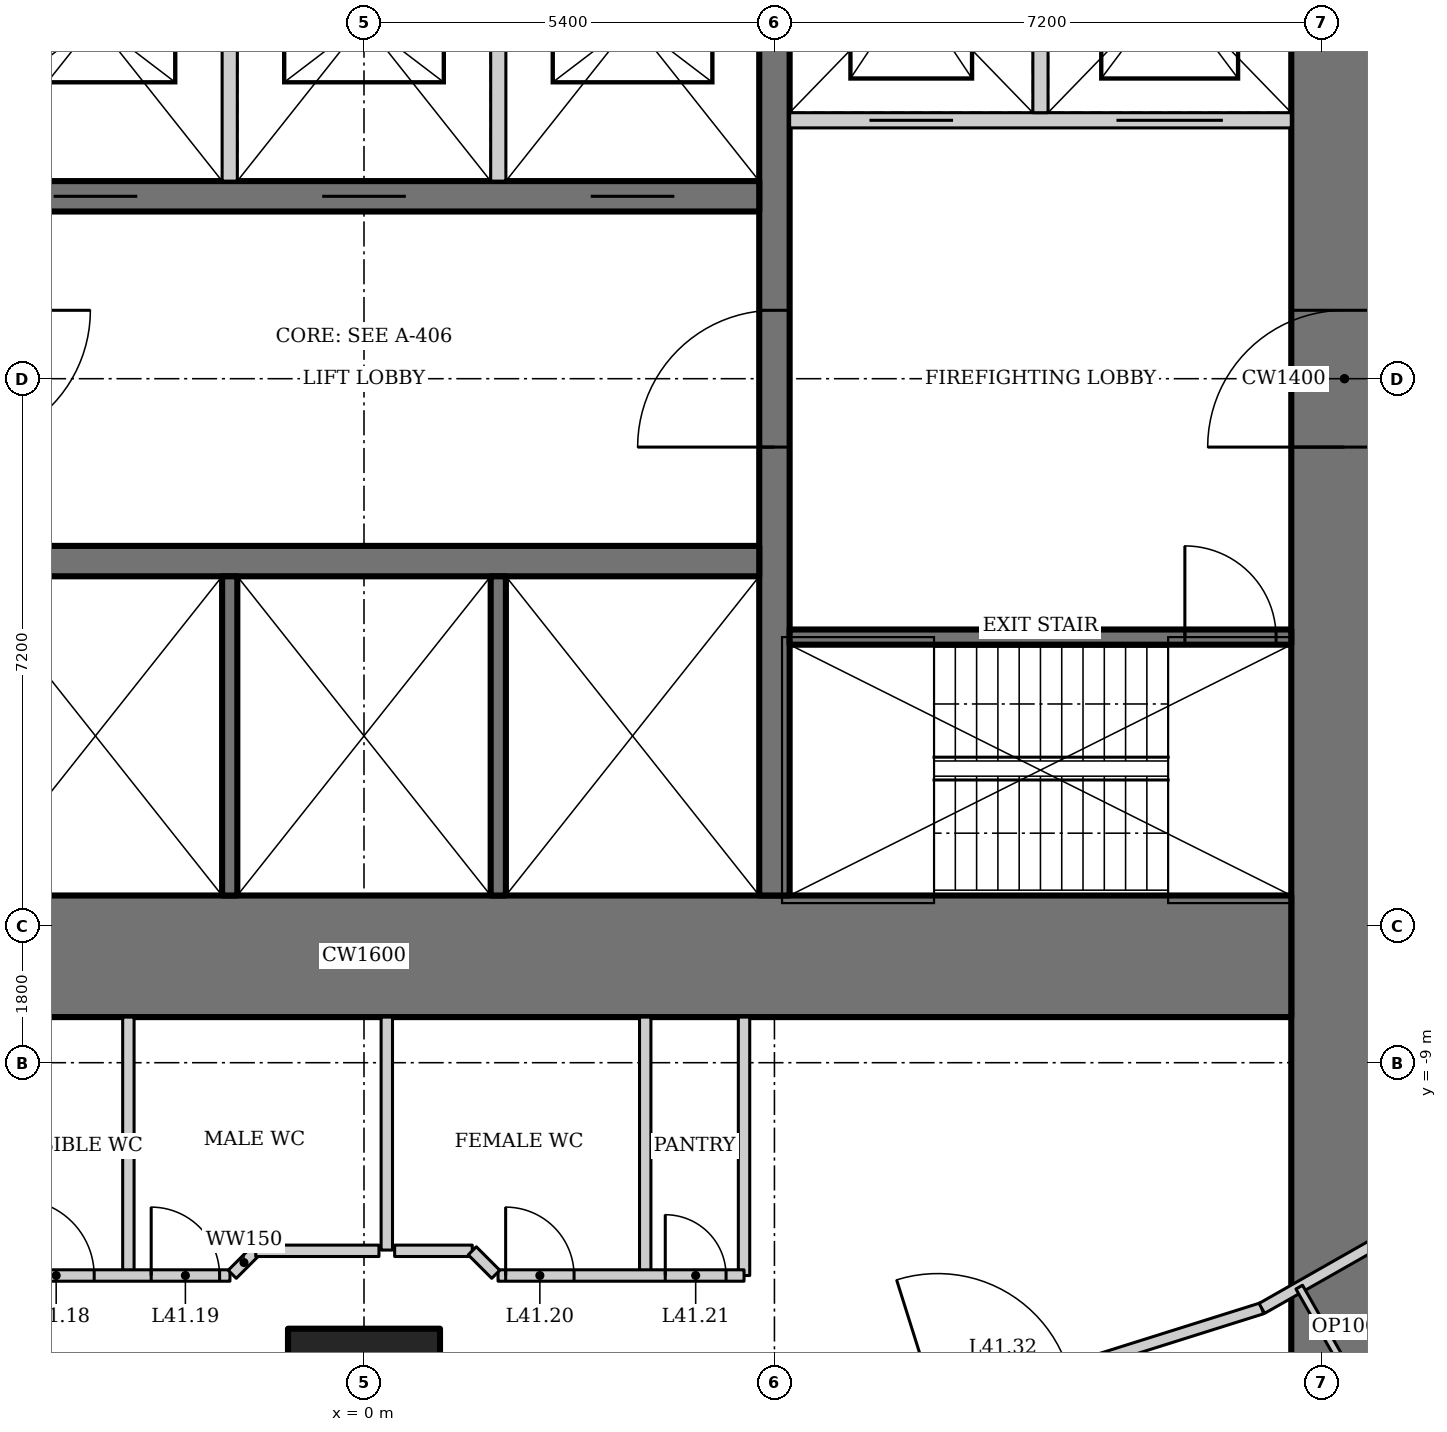
"""IFC4 building model, lengths in metres.
Left out: names, types, materials, properties, quantities, classifications, styles, units other than length and angle.
Written with IfcOpenShell. Run it as: python <this file> out.ifc"""

import sys

from ifc_helpers import new_model, si_unit, direction, frame, frame_2d, origin, origin_2d, place, context, subcontext, project, spatial, rectangle, hollow_rectangle, extrude, element, fill, save


model = new_model("IFC4")
c1 = context("Model", 3, precision=1e-05, world=origin(), true_north=direction((0.0, 1.0)))
c2 = subcontext(c1, "Body", "Model", "MODEL_VIEW")
j1 = project(units=[si_unit("LENGTHUNIT", "METRE"), si_unit("PLANEANGLEUNIT", "RADIAN")], contexts=[c1])
p1 = place(None, origin())
s1 = spatial("IfcSite", under=j1, at=p1, CompositionType="ELEMENT")
p2 = place(p1, origin())
s2 = spatial("IfcBuilding", under=s1, at=p2, CompositionType="ELEMENT")
p3 = place(p2, frame((0.0, 0.0, 176.2)))
s3 = spatial("IfcBuildingStorey", under=s2, at=p3, CompositionType="ELEMENT", Elevation=176.2)
p4 = place(p3, frame((0.0, -13.5, 0.0), z_axis=(0.0, 0.0, 1.0), x_axis=(1.0, 0.0, 0.0)))
e1 = element("IfcColumn", 1, at=p4, inside=s3, PredefinedType="COLUMN", context=c2, shape_type="SweptSolid", body=[
    extrude(hollow_rectangle(XDim=2.0, YDim=2.0, WallThickness=0.17, at=origin_2d()), origin(), (0.0, 0.0, 1.0), 4.2),
])
p5 = place(p3, frame((12.9, -13.0, 0.0), z_axis=(0.0, 0.0, 1.0), x_axis=(0.0, 1.0, 0.0)))
e2 = element("IfcWall", 2, at=p5, inside=s3, PredefinedType="SHEAR", context=c2, shape_type="SweptSolid", body=[
    extrude(rectangle(XDim=26.0, YDim=1.4, at=frame_2d((13.0, 0.0))), origin(), (0.0, 0.0, 1.0), 4.2),
])
p6 = place(p5, frame((12.1, 0.0, 0.0)))
e3 = element("IfcOpeningElement", 3, at=p6, cuts=e2, PredefinedType="OPENING", context=c2, shape_type="SweptSolid", body=[
    extrude(rectangle(XDim=1.8, YDim=2.1, at=frame_2d((0.9, 1.05))), frame((0.0, 0.71, 0.0), z_axis=(0.0, -1.0, 0.0), x_axis=(1.0, 0.0, 0.0)), (0.0, 0.0, 1.0), 1.42),
])
p7 = place(p3, frame((-12.2, -7.6, 0.0), z_axis=(0.0, 0.0, 1.0), x_axis=(1.0, 0.0, 0.0)))
e4 = element("IfcWall", 4, at=p7, inside=s3, PredefinedType="SHEAR", context=c2, shape_type="SweptSolid", body=[
    extrude(rectangle(XDim=24.4, YDim=1.6, at=frame_2d((12.2, 0.0))), origin(), (0.0, 0.0, 1.0), 4.2),
])
p8 = place(p3, frame((5.4, -6.8, 0.0), z_axis=(0.0, 0.0, 1.0), x_axis=(0.0, 1.0, 0.0)))
e5 = element("IfcWall", 5, at=p8, inside=s3, PredefinedType="SHEAR", context=c2, shape_type="SweptSolid", body=[
    extrude(rectangle(XDim=13.6, YDim=0.4, at=frame_2d((6.8, 0.0))), origin(), (0.0, 0.0, 1.0), 4.2),
])
p9 = place(p8, frame((5.9, 0.0, 0.0)))
e6 = element("IfcOpeningElement", 6, at=p9, cuts=e5, PredefinedType="OPENING", context=c2, shape_type="SweptSolid", body=[
    extrude(rectangle(XDim=1.8, YDim=2.1, at=frame_2d((0.9, 1.05))), frame((0.0, 0.21, 0.0), z_axis=(0.0, -1.0, 0.0), x_axis=(1.0, 0.0, 0.0)), (0.0, 0.0, 1.0), 0.42),
])
p10 = place(p3, frame((-5.2, -2.4, 0.0), z_axis=(0.0, 0.0, 1.0), x_axis=(1.0, 0.0, 0.0)))
e7 = element("IfcWall", 7, at=p10, inside=s3, PredefinedType="SHEAR", context=c2, shape_type="SweptSolid", body=[
    extrude(rectangle(XDim=10.4, YDim=0.4, at=frame_2d((5.2, 0.0))), origin(), (0.0, 0.0, 1.0), 4.2),
])
for number, where, z_axis, x_axis in (
    (8, (-1.767, -2.6, 0.0), (0.0, 0.0, 1.0), (0.0, -1.0, 0.0)),
    (9, (1.767, -2.6, 0.0), (0.0, 0.0, 1.0), (0.0, -1.0, 0.0)),
):
    element("IfcWall", number, at=place(p3, frame(where, z_axis=z_axis, x_axis=x_axis)), inside=s3, PredefinedType="SOLIDWALL", context=c2, shape_type="SweptSolid", body=[
        extrude(rectangle(XDim=4.2, YDim=0.2, at=frame_2d((2.1, 0.0))), origin(), (0.0, 0.0, 1.0), 4.2),
    ])
p11 = place(p3, frame((5.2, 2.4, 0.0), z_axis=(0.0, 0.0, 1.0), x_axis=(-1.0, 0.0, 0.0)))
e10 = element("IfcWall", 10, at=p11, inside=s3, PredefinedType="SHEAR", context=c2, shape_type="SweptSolid", body=[
    extrude(rectangle(XDim=10.4, YDim=0.4, at=frame_2d((5.2, 0.0))), origin(), (0.0, 0.0, 1.0), 4.2),
])
p12 = place(p11, frame((8.183, 0.0, 0.0)))
e11 = element("IfcOpeningElement", 11, at=p12, cuts=e10, PredefinedType="OPENING", context=c2, shape_type="SweptSolid", body=[
    extrude(rectangle(XDim=1.1, YDim=2.2, at=frame_2d((0.55, 1.1))), frame((0.0, 0.21, 0.0), z_axis=(0.0, -1.0, 0.0), x_axis=(1.0, 0.0, 0.0)), (0.0, 0.0, 1.0), 0.42),
])
p13 = place(p11, frame((4.65, 0.0, 0.0)))
e12 = element("IfcOpeningElement", 12, at=p13, cuts=e10, PredefinedType="OPENING", context=c2, shape_type="SweptSolid", body=[
    extrude(rectangle(XDim=1.1, YDim=2.2, at=frame_2d((0.55, 1.1))), frame((0.0, 0.21, 0.0), z_axis=(0.0, -1.0, 0.0), x_axis=(1.0, 0.0, 0.0)), (0.0, 0.0, 1.0), 0.42),
])
p14 = place(p11, frame((1.117, 0.0, 0.0)))
e13 = element("IfcOpeningElement", 13, at=p14, cuts=e10, PredefinedType="OPENING", context=c2, shape_type="SweptSolid", body=[
    extrude(rectangle(XDim=1.1, YDim=2.2, at=frame_2d((0.55, 1.1))), frame((0.0, 0.21, 0.0), z_axis=(0.0, -1.0, 0.0), x_axis=(1.0, 0.0, 0.0)), (0.0, 0.0, 1.0), 0.42),
])
for number, where, z_axis, x_axis in (
    (14, (-1.767, 2.6, 0.0), (0.0, 0.0, 1.0), (0.0, 1.0, 0.0)),
    (15, (1.767, 2.6, 0.0), (0.0, 0.0, 1.0), (0.0, 1.0, 0.0)),
):
    element("IfcWall", number, at=place(p3, frame(where, z_axis=z_axis, x_axis=x_axis)), inside=s3, PredefinedType="SOLIDWALL", context=c2, shape_type="SweptSolid", body=[
        extrude(rectangle(XDim=4.2, YDim=0.2, at=frame_2d((2.1, 0.0))), origin(), (0.0, 0.0, 1.0), 4.2),
    ])
p15 = place(p3, frame((5.6, -3.4, 0.0), z_axis=(0.0, 0.0, 1.0), x_axis=(1.0, 0.0, 0.0)))
e16 = element("IfcWall", 16, at=p15, inside=s3, PredefinedType="SHEAR", context=c2, shape_type="SweptSolid", body=[
    extrude(rectangle(XDim=6.6, YDim=0.2, at=frame_2d((3.3, 0.0))), origin(), (0.0, 0.0, 1.0), 4.2),
])
p16 = place(p15, frame((5.2, 0.0, 0.0)))
e17 = element("IfcOpeningElement", 17, at=p16, cuts=e16, PredefinedType="OPENING", context=c2, shape_type="SweptSolid", body=[
    extrude(rectangle(XDim=1.2, YDim=2.1, at=frame_2d((0.6, 1.05))), frame((0.0, 0.11, 0.0), z_axis=(0.0, -1.0, 0.0), x_axis=(1.0, 0.0, 0.0)), (0.0, 0.0, 1.0), 0.22),
])
p17 = place(p3, frame((12.2, 3.4, 0.0), z_axis=(0.0, 0.0, 1.0), x_axis=(-1.0, 0.0, 0.0)))
e18 = element("IfcWall", 18, at=p17, inside=s3, PredefinedType="SOLIDWALL", context=c2, shape_type="SweptSolid", body=[
    extrude(rectangle(XDim=6.6, YDim=0.2, at=frame_2d((3.3, 0.0))), origin(), (0.0, 0.0, 1.0), 4.2),
])
p18 = place(p17, frame((4.45, 0.0, 0.0)))
e19 = element("IfcOpeningElement", 19, at=p18, cuts=e18, PredefinedType="OPENING", context=c2, shape_type="SweptSolid", body=[
    extrude(rectangle(XDim=1.1, YDim=2.2, at=frame_2d((0.55, 1.1))), frame((0.0, 0.11, 0.0), z_axis=(0.0, -1.0, 0.0), x_axis=(1.0, 0.0, 0.0)), (0.0, 0.0, 1.0), 0.22),
])
p19 = place(p17, frame((0.9, 0.0, 0.0)))
e20 = element("IfcOpeningElement", 20, at=p19, cuts=e18, PredefinedType="OPENING", context=c2, shape_type="SweptSolid", body=[
    extrude(rectangle(XDim=1.4, YDim=2.2, at=frame_2d((0.7, 1.1))), frame((0.0, 0.11, 0.0), z_axis=(0.0, -1.0, 0.0), x_axis=(1.0, 0.0, 0.0)), (0.0, 0.0, 1.0), 0.22),
])
p20 = place(p3, frame((8.9, 3.5, 0.0), z_axis=(0.0, 0.0, 1.0), x_axis=(0.0, 1.0, 0.0)))
e21 = element("IfcWall", 21, at=p20, inside=s3, PredefinedType="SOLIDWALL", context=c2, shape_type="SweptSolid", body=[
    extrude(rectangle(XDim=3.3, YDim=0.2, at=frame_2d((1.65, 0.0))), origin(), (0.0, 0.0, 1.0), 4.2),
])
p21 = place(p3, frame((7.004, -13.746, 0.0), z_axis=(0.0, 0.0, 1.0), x_axis=(0.953893934057, 0.300143903101, 0.0)))
e22 = element("IfcWall", 22, at=p21, inside=s3, PredefinedType="PARTITIONING", context=c2, shape_type="SweptSolid", body=[
    extrude(rectangle(XDim=5.042, YDim=0.15, at=frame_2d((2.521, 0.0))), origin(), (0.0, 0.0, 1.0), 4.05),
])
p22 = place(p21, frame((0.57, 0.0, 0.0)))
e23 = element("IfcOpeningElement", 23, at=p22, cuts=e22, PredefinedType="OPENING", context=c2, shape_type="SweptSolid", body=[
    extrude(rectangle(XDim=1.8, YDim=2.1, at=frame_2d((0.9, 1.05))), frame((0.0, 0.085, 0.0), z_axis=(0.0, -1.0, 0.0), x_axis=(1.0, 0.0, 0.0)), (0.0, 0.0, 1.0), 0.17),
])
p23 = place(p3, frame((11.813, -12.232, 0.0), z_axis=(0.0, 0.0, 1.0), x_axis=(0.869375991036, 0.494151177485, 0.0)))
e24 = element("IfcWall", 24, at=p23, inside=s3, PredefinedType="PARTITIONING", context=c2, shape_type="SweptSolid", body=[
    extrude(rectangle(XDim=5.532, YDim=0.15, at=frame_2d((2.766, 0.0))), origin(), (0.0, 0.0, 1.0), 4.05),
])
for number, where, z_axis, x_axis in (
    (25, (5.0, -8.4, 0.0), (0.0, 0.0, 1.0), (0.0, -1.0, 0.0)),
    (26, (-3.1, -8.4, 0.0), (0.0, 0.0, 1.0), (0.0, -1.0, 0.0)),
    (27, (3.7, -8.4, 0.0), (0.0, 0.0, 1.0), (0.0, -1.0, 0.0)),
):
    element("IfcWall", number, at=place(p3, frame(where, z_axis=z_axis, x_axis=x_axis)), inside=s3, PredefinedType="SOLIDWALL", context=c2, shape_type="SweptSolid", body=[
        extrude(rectangle(XDim=3.4, YDim=0.15, at=frame_2d((1.7, 0.0))), origin(), (0.0, 0.0, 1.0), 4.05),
    ])
p24 = place(p3, frame((12.9, -13.0, 0.0), z_axis=(0.0, 0.0, 1.0), x_axis=(-0.494173075358, 0.869363543974, 0.0)))
e28 = element("IfcWall", 28, at=p24, inside=s3, PredefinedType="PARTITIONING", context=c2, shape_type="SweptSolid", body=[
    extrude(rectangle(XDim=1.204, YDim=0.1, at=frame_2d((0.602, 0.0))), origin(), (0.0, 0.0, 1.0), 4.05),
])
p25 = place(p3, frame((-5.0, -11.8, 0.0), z_axis=(0.0, 0.0, 1.0), x_axis=(1.0, 0.0, 0.0)))
e29 = element("IfcWall", 29, at=p25, inside=s3, PredefinedType="SOLIDWALL", context=c2, shape_type="SweptSolid", body=[
    extrude(rectangle(XDim=3.236, YDim=0.15, at=frame_2d((1.618, 0.0))), origin(), (0.0, 0.0, 1.0), 4.05),
])
p26 = place(p25, frame((0.45, 0.0, 0.0)))
e30 = element("IfcOpeningElement", 30, at=p26, cuts=e29, PredefinedType="OPENING", context=c2, shape_type="SweptSolid", body=[
    extrude(rectangle(XDim=1.0, YDim=2.1, at=frame_2d((0.5, 1.05))), frame((0.0, 0.085, 0.0), z_axis=(0.0, -1.0, 0.0), x_axis=(1.0, 0.0, 0.0)), (0.0, 0.0, 1.0), 0.17),
])
p27 = place(p25, frame((2.2, 0.0, 0.0)))
e31 = element("IfcOpeningElement", 31, at=p27, cuts=e29, PredefinedType="OPENING", context=c2, shape_type="SweptSolid", body=[
    extrude(rectangle(XDim=0.9, YDim=2.1, at=frame_2d((0.45, 1.05))), frame((0.0, 0.085, 0.0), z_axis=(0.0, -1.0, 0.0), x_axis=(1.0, 0.0, 0.0)), (0.0, 0.0, 1.0), 0.17),
])
p28 = place(p3, frame((1.764, -11.8, 0.0), z_axis=(0.0, 0.0, 1.0), x_axis=(1.0, 0.0, 0.0)))
e32 = element("IfcWall", 32, at=p28, inside=s3, PredefinedType="SOLIDWALL", context=c2, shape_type="SweptSolid", body=[
    extrude(rectangle(XDim=3.236, YDim=0.15, at=frame_2d((1.618, 0.0))), origin(), (0.0, 0.0, 1.0), 4.05),
])
p29 = place(p28, frame((0.1, 0.0, 0.0)))
e33 = element("IfcOpeningElement", 33, at=p29, cuts=e32, PredefinedType="OPENING", context=c2, shape_type="SweptSolid", body=[
    extrude(rectangle(XDim=0.9, YDim=2.1, at=frame_2d((0.45, 1.05))), frame((0.0, 0.085, 0.0), z_axis=(0.0, -1.0, 0.0), x_axis=(1.0, 0.0, 0.0)), (0.0, 0.0, 1.0), 0.17),
])
p30 = place(p28, frame((2.2, 0.0, 0.0)))
e34 = element("IfcOpeningElement", 34, at=p30, cuts=e32, PredefinedType="OPENING", context=c2, shape_type="SweptSolid", body=[
    extrude(rectangle(XDim=0.8, YDim=2.1, at=frame_2d((0.4, 1.05))), frame((0.0, 0.085, 0.0), z_axis=(0.0, -1.0, 0.0), x_axis=(1.0, 0.0, 0.0)), (0.0, 0.0, 1.0), 0.17),
])
p31 = place(p3, frame((0.3, -8.4, 0.0), z_axis=(0.0, 0.0, 1.0), x_axis=(0.0, -1.0, 0.0)))
e35 = element("IfcWall", 35, at=p31, inside=s3, PredefinedType="SOLIDWALL", context=c2, shape_type="SweptSolid", body=[
    extrude(rectangle(XDim=3.065, YDim=0.15, at=frame_2d((1.533, 0.0))), origin(), (0.0, 0.0, 1.0), 4.05),
])
p32 = place(p3, frame((-1.734, -11.784, 0.0), z_axis=(0.0, 0.0, 1.0), x_axis=(0.707106781187, 0.707106781187, 0.0)))
e36 = element("IfcWall", 36, at=p32, inside=s3, PredefinedType="SOLIDWALL", context=c2, shape_type="SweptSolid", body=[
    extrude(rectangle(XDim=0.437, YDim=0.15, at=frame_2d((0.219, 0.0))), origin(), (0.0, 0.0, 1.0), 4.05),
])
p33 = place(p3, frame((-1.425, -11.475, 0.0), z_axis=(0.0, 0.0, 1.0), x_axis=(1.0, 0.0, 0.0)))
e37 = element("IfcWall", 37, at=p33, inside=s3, PredefinedType="SOLIDWALL", context=c2, shape_type="SweptSolid", body=[
    extrude(rectangle(XDim=1.621, YDim=0.15, at=frame_2d((0.811, 0.0))), origin(), (0.0, 0.0, 1.0), 4.05),
])
p34 = place(p3, frame((0.403, -11.475, 0.0), z_axis=(0.0, 0.0, 1.0), x_axis=(1.0, 0.0, 0.0)))
e38 = element("IfcWall", 38, at=p34, inside=s3, PredefinedType="SOLIDWALL", context=c2, shape_type="SweptSolid", body=[
    extrude(rectangle(XDim=1.021, YDim=0.15, at=frame_2d((0.511, 0.0))), origin(), (0.0, 0.0, 1.0), 4.05),
])
p35 = place(p3, frame((1.425, -11.475, 0.0), z_axis=(0.0, 0.0, 1.0), x_axis=(0.707106781187, -0.707106781187, 0.0)))
e39 = element("IfcWall", 39, at=p35, inside=s3, PredefinedType="SOLIDWALL", context=c2, shape_type="SweptSolid", body=[
    extrude(rectangle(XDim=0.437, YDim=0.15, at=frame_2d((0.219, 0.0))), origin(), (0.0, 0.0, 1.0), 4.05),
])
p36 = place(p9, origin())
e40 = element("IfcDoor", 40, at=p36, inside=s3, OperationType="DOUBLE_DOOR_DOUBLE_SWING", PredefinedType="DOOR", context=c2, shape_type="SweptSolid", body=[
    extrude(rectangle(XDim=1.8, YDim=2.1, at=frame_2d((0.9, 1.05))), frame((0.0, 0.025, 0.0), z_axis=(0.0, -1.0, 0.0), x_axis=(1.0, 0.0, 0.0)), (0.0, 0.0, 1.0), 0.05),
])
fill(e6, e40)
p37 = place(p16, origin())
e41 = element("IfcDoor", 41, at=p37, inside=s3, OperationType="SINGLE_SWING_RIGHT", PredefinedType="DOOR", context=c2, shape_type="SweptSolid", body=[
    extrude(rectangle(XDim=1.2, YDim=2.1, at=frame_2d((0.6, 1.05))), frame((0.0, 0.025, 0.0), z_axis=(0.0, -1.0, 0.0), x_axis=(1.0, 0.0, 0.0)), (0.0, 0.0, 1.0), 0.05),
])
fill(e17, e41)
p38 = place(p6, origin())
e42 = element("IfcDoor", 42, at=p38, inside=s3, OperationType="DOUBLE_DOOR_DOUBLE_SWING", PredefinedType="DOOR", context=c2, shape_type="SweptSolid", body=[
    extrude(rectangle(XDim=1.8, YDim=2.1, at=frame_2d((0.9, 1.05))), frame((0.0, 0.025, 0.0), z_axis=(0.0, -1.0, 0.0), x_axis=(1.0, 0.0, 0.0)), (0.0, 0.0, 1.0), 0.05),
])
fill(e3, e42)
p39 = place(p12, origin())
e43 = element("IfcDoor", 43, at=p39, inside=s3, OperationType="DOUBLE_DOOR_SLIDING", PredefinedType="DOOR", context=c2, shape_type="SweptSolid", body=[
    extrude(rectangle(XDim=1.1, YDim=2.2, at=frame_2d((0.55, 1.1))), frame((0.0, 0.025, 0.0), z_axis=(0.0, -1.0, 0.0), x_axis=(1.0, 0.0, 0.0)), (0.0, 0.0, 1.0), 0.05),
])
fill(e11, e43)
p40 = place(p13, origin())
e44 = element("IfcDoor", 44, at=p40, inside=s3, OperationType="DOUBLE_DOOR_SLIDING", PredefinedType="DOOR", context=c2, shape_type="SweptSolid", body=[
    extrude(rectangle(XDim=1.1, YDim=2.2, at=frame_2d((0.55, 1.1))), frame((0.0, 0.025, 0.0), z_axis=(0.0, -1.0, 0.0), x_axis=(1.0, 0.0, 0.0)), (0.0, 0.0, 1.0), 0.05),
])
fill(e12, e44)
p41 = place(p14, origin())
e45 = element("IfcDoor", 45, at=p41, inside=s3, OperationType="DOUBLE_DOOR_SLIDING", PredefinedType="DOOR", context=c2, shape_type="SweptSolid", body=[
    extrude(rectangle(XDim=1.1, YDim=2.2, at=frame_2d((0.55, 1.1))), frame((0.0, 0.025, 0.0), z_axis=(0.0, -1.0, 0.0), x_axis=(1.0, 0.0, 0.0)), (0.0, 0.0, 1.0), 0.05),
])
fill(e13, e45)
p42 = place(p18, origin())
e46 = element("IfcDoor", 46, at=p42, inside=s3, OperationType="DOUBLE_DOOR_SLIDING", PredefinedType="DOOR", context=c2, shape_type="SweptSolid", body=[
    extrude(rectangle(XDim=1.1, YDim=2.2, at=frame_2d((0.55, 1.1))), frame((0.0, 0.025, 0.0), z_axis=(0.0, -1.0, 0.0), x_axis=(1.0, 0.0, 0.0)), (0.0, 0.0, 1.0), 0.05),
])
fill(e19, e46)
p43 = place(p19, origin())
e47 = element("IfcDoor", 47, at=p43, inside=s3, OperationType="DOUBLE_DOOR_SLIDING", PredefinedType="DOOR", context=c2, shape_type="SweptSolid", body=[
    extrude(rectangle(XDim=1.4, YDim=2.2, at=frame_2d((0.7, 1.1))), frame((0.0, 0.025, 0.0), z_axis=(0.0, -1.0, 0.0), x_axis=(1.0, 0.0, 0.0)), (0.0, 0.0, 1.0), 0.05),
])
fill(e20, e47)
p44 = place(p26, origin())
e48 = element("IfcDoor", 48, at=p44, inside=s3, OperationType="SINGLE_SWING_LEFT", PredefinedType="DOOR", context=c2, shape_type="SweptSolid", body=[
    extrude(rectangle(XDim=1.0, YDim=2.1, at=frame_2d((0.5, 1.05))), frame((0.0, 0.025, 0.0), z_axis=(0.0, -1.0, 0.0), x_axis=(1.0, 0.0, 0.0)), (0.0, 0.0, 1.0), 0.05),
])
fill(e30, e48)
p45 = place(p27, origin())
e49 = element("IfcDoor", 49, at=p45, inside=s3, OperationType="SINGLE_SWING_LEFT", PredefinedType="DOOR", context=c2, shape_type="SweptSolid", body=[
    extrude(rectangle(XDim=0.9, YDim=2.1, at=frame_2d((0.45, 1.05))), frame((0.0, 0.025, 0.0), z_axis=(0.0, -1.0, 0.0), x_axis=(1.0, 0.0, 0.0)), (0.0, 0.0, 1.0), 0.05),
])
fill(e31, e49)
p46 = place(p29, origin())
e50 = element("IfcDoor", 50, at=p46, inside=s3, OperationType="SINGLE_SWING_LEFT", PredefinedType="DOOR", context=c2, shape_type="SweptSolid", body=[
    extrude(rectangle(XDim=0.9, YDim=2.1, at=frame_2d((0.45, 1.05))), frame((0.0, 0.025, 0.0), z_axis=(0.0, -1.0, 0.0), x_axis=(1.0, 0.0, 0.0)), (0.0, 0.0, 1.0), 0.05),
])
fill(e33, e50)
p47 = place(p30, origin())
e51 = element("IfcDoor", 51, at=p47, inside=s3, OperationType="SINGLE_SWING_LEFT", PredefinedType="DOOR", context=c2, shape_type="SweptSolid", body=[
    extrude(rectangle(XDim=0.8, YDim=2.1, at=frame_2d((0.4, 1.05))), frame((0.0, 0.025, 0.0), z_axis=(0.0, -1.0, 0.0), x_axis=(1.0, 0.0, 0.0)), (0.0, 0.0, 1.0), 0.05),
])
fill(e34, e51)
save(model, sys.argv[1])
